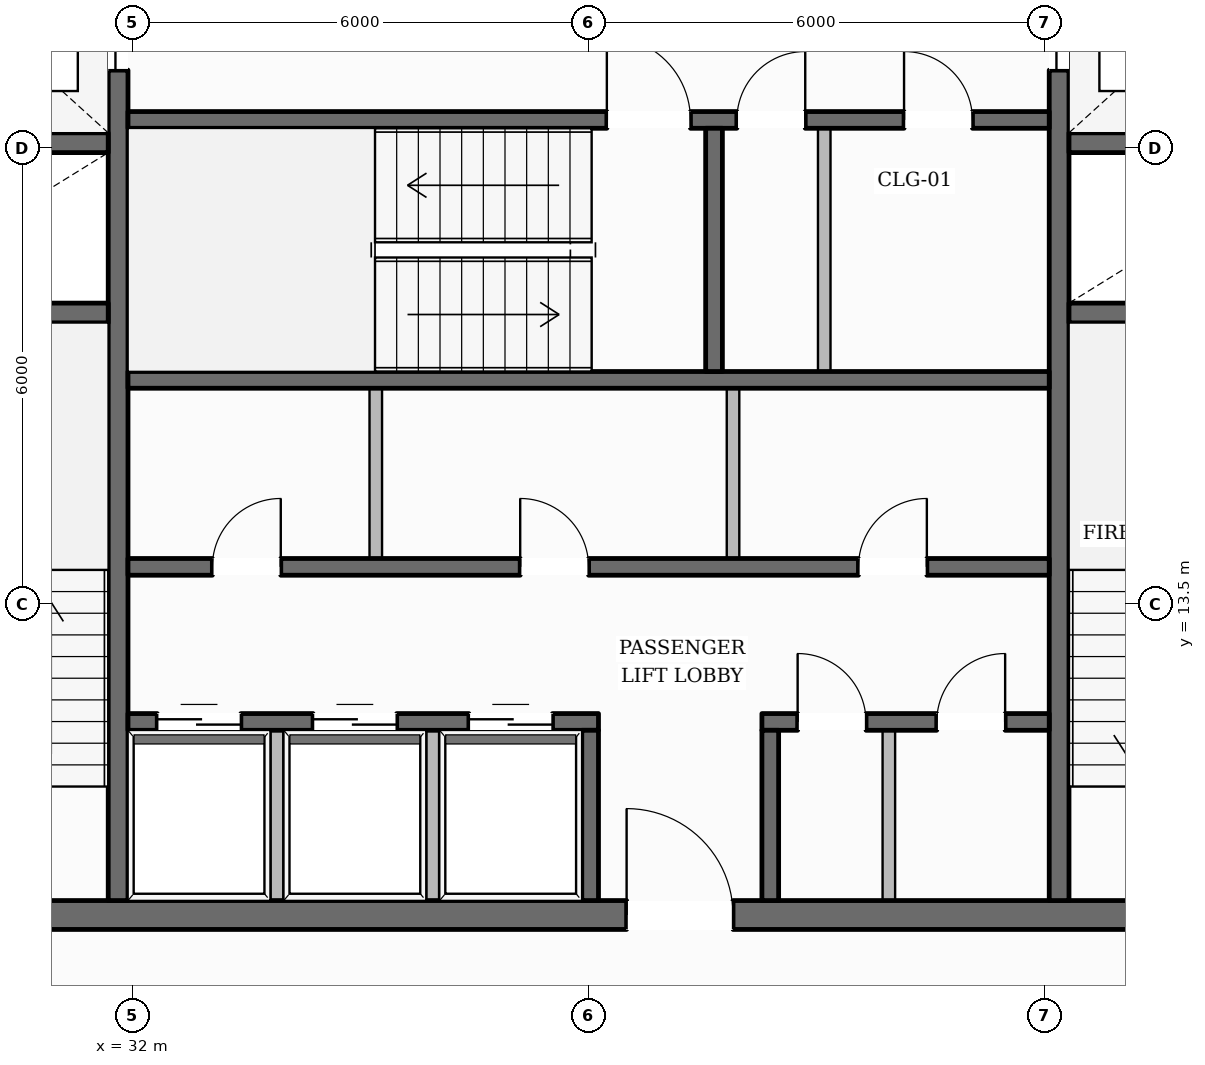
"""IFC4 building model, lengths in metres.
Left out: names, types, materials, properties, quantities, classifications, styles, units other than length and angle.
Written with IfcOpenShell. Run it as: python <this file> out.ifc"""

import sys

from ifc_helpers import new_model, si_unit, direction, frame, frame_2d, origin, place, context, subcontext, project, spatial, rectangle, extrude, element, fill, save


model = new_model("IFC4")
c1 = context("Model", 3, precision=1e-05, world=origin(), true_north=direction((0.0, 1.0)))
c2 = subcontext(c1, "Body", "Model", "MODEL_VIEW")
j1 = project(units=[si_unit("LENGTHUNIT", "METRE"), si_unit("PLANEANGLEUNIT", "RADIAN")], contexts=[c1])
p1 = place(None, origin())
s1 = spatial("IfcSite", under=j1, at=p1, CompositionType="ELEMENT")
p2 = place(p1, origin())
s2 = spatial("IfcBuilding", under=s1, at=p2, CompositionType="ELEMENT")
p3 = place(p2, frame((0.0, 0.0, 301.1)))
s3 = spatial("IfcBuildingStorey", under=s2, at=p3, CompositionType="ELEMENT", Elevation=301.1)
p4 = place(p3, frame((28.1, 9.41, 0.0), z_axis=(0.0, 0.0, 1.0), x_axis=(1.0, 0.0, 0.0)))
e1 = element("IfcWall", 1, at=p4, inside=s3, PredefinedType="SOLIDWALL", context=c2, shape_type="SweptSolid", body=[
    extrude(rectangle(XDim=19.8, YDim=0.38, at=frame_2d((9.9, 0.0))), origin(), (0.0, 0.0, 1.0), 3.635),
])
p5 = place(p4, frame((10.4, 0.0, 0.0)))
e2 = element("IfcOpeningElement", 2, at=p5, cuts=e1, PredefinedType="OPENING", context=c2, shape_type="SweptSolid", body=[
    extrude(rectangle(XDim=1.4, YDim=2.2, at=frame_2d((0.7, 1.1))), frame((0.0, 0.2, 0.0), z_axis=(0.0, -1.0, 0.0), x_axis=(1.0, 0.0, 0.0)), (0.0, 0.0, 1.0), 0.4),
])
p6 = place(p3, frame((31.81, 9.6, 0.0), z_axis=(0.0, 0.0, 1.0), x_axis=(0.0, 1.0, 0.0)))
e3 = element("IfcWall", 3, at=p6, inside=s3, PredefinedType="SHEAR", context=c2, shape_type="SweptSolid", body=[
    extrude(rectangle(XDim=13.0, YDim=0.26, at=frame_2d((6.5, 0.0))), origin(), (0.0, 0.0, 1.0), 3.635),
])
p7 = place(p6, frame((10.925, 0.0, 0.0)))
e4 = element("IfcOpeningElement", 4, at=p7, cuts=e3, PredefinedType="OPENING", context=c2, shape_type="SweptSolid", body=[
    extrude(rectangle(XDim=1.25, YDim=2.25, at=frame_2d((0.625, 1.125))), frame((0.0, 0.14, 0.0), z_axis=(0.0, -1.0, 0.0), x_axis=(1.0, 0.0, 0.0)), (0.0, 0.0, 1.0), 0.28),
])
p8 = place(p3, frame((44.19, 9.6, 0.0), z_axis=(0.0, 0.0, 1.0), x_axis=(0.0, 1.0, 0.0)))
e5 = element("IfcWall", 5, at=p8, inside=s3, PredefinedType="SHEAR", context=c2, shape_type="SweptSolid", body=[
    extrude(rectangle(XDim=13.0, YDim=0.26, at=frame_2d((6.5, 0.0))), origin(), (0.0, 0.0, 1.0), 3.635),
])
p9 = place(p8, frame((10.925, 0.0, 0.0)))
e6 = element("IfcOpeningElement", 6, at=p9, cuts=e5, PredefinedType="OPENING", context=c2, shape_type="SweptSolid", body=[
    extrude(rectangle(XDim=1.25, YDim=2.25, at=frame_2d((0.625, 1.125))), frame((0.0, 0.14, 0.0), z_axis=(0.0, -1.0, 0.0), x_axis=(1.0, 0.0, 0.0)), (0.0, 0.0, 1.0), 0.28),
])
for number, where, z_axis, x_axis in (
    (7, (28.48, 17.33, 0.0), (0.0, 0.0, 1.0), (1.0, 0.0, 0.0)),
    (8, (28.48, 19.57, 0.0), (0.0, 0.0, 1.0), (1.0, 0.0, 0.0)),
    (9, (44.32, 17.33, 0.0), (0.0, 0.0, 1.0), (1.0, 0.0, 0.0)),
    (10, (44.32, 19.57, 0.0), (0.0, 0.0, 1.0), (1.0, 0.0, 0.0)),
):
    element("IfcWall", number, at=place(p3, frame(where, z_axis=z_axis, x_axis=x_axis)), inside=s3, PredefinedType="SHEAR", context=c2, shape_type="SweptSolid", body=[
        extrude(rectangle(XDim=3.2, YDim=0.26, at=frame_2d((1.6, 0.0))), origin(), (0.0, 0.0, 1.0), 3.635),
    ])
p10 = place(p3, frame((31.94, 19.87, 0.0), z_axis=(0.0, 0.0, 1.0), x_axis=(1.0, 0.0, 0.0)))
e11 = element("IfcWall", 11, at=p10, inside=s3, PredefinedType="SOLIDWALL", context=c2, shape_type="SweptSolid", body=[
    extrude(rectangle(XDim=12.12, YDim=0.22, at=frame_2d((6.06, 0.0))), origin(), (0.0, 0.0, 1.0), 3.635),
])
p11 = place(p10, frame((6.3, 0.0, 0.0)))
e12 = element("IfcOpeningElement", 12, at=p11, cuts=e11, PredefinedType="OPENING", context=c2, shape_type="SweptSolid", body=[
    extrude(rectangle(XDim=1.1, YDim=2.15, at=frame_2d((0.55, 1.075))), frame((0.0, 0.12, 0.0), z_axis=(0.0, -1.0, 0.0), x_axis=(1.0, 0.0, 0.0)), (0.0, 0.0, 1.0), 0.24),
])
p12 = place(p10, frame((8.01, 0.0, 0.0)))
e13 = element("IfcOpeningElement", 13, at=p12, cuts=e11, PredefinedType="OPENING", context=c2, shape_type="SweptSolid", body=[
    extrude(rectangle(XDim=0.9, YDim=2.1, at=frame_2d((0.45, 1.05))), frame((0.0, 0.12, 0.0), z_axis=(0.0, -1.0, 0.0), x_axis=(1.0, 0.0, 0.0)), (0.0, 0.0, 1.0), 0.24),
])
p13 = place(p10, frame((10.21, 0.0, 0.0)))
e14 = element("IfcOpeningElement", 14, at=p13, cuts=e11, PredefinedType="OPENING", context=c2, shape_type="SweptSolid", body=[
    extrude(rectangle(XDim=0.9, YDim=2.1, at=frame_2d((0.45, 1.05))), frame((0.0, 0.12, 0.0), z_axis=(0.0, -1.0, 0.0), x_axis=(1.0, 0.0, 0.0)), (0.0, 0.0, 1.0), 0.24),
])
p14 = place(p3, frame((31.94, 16.45, 0.0), z_axis=(0.0, 0.0, 1.0), x_axis=(1.0, 0.0, 0.0)))
e15 = element("IfcWall", 15, at=p14, inside=s3, PredefinedType="SOLIDWALL", context=c2, shape_type="SweptSolid", body=[
    extrude(rectangle(XDim=12.12, YDim=0.22, at=frame_2d((6.06, 0.0))), origin(), (0.0, 0.0, 1.0), 3.635),
])
p15 = place(p3, frame((39.65, 16.56, 0.0), z_axis=(0.0, 0.0, 1.0), x_axis=(0.0, 1.0, 0.0)))
e16 = element("IfcWall", 16, at=p15, inside=s3, PredefinedType="SOLIDWALL", context=c2, shape_type="SweptSolid", body=[
    extrude(rectangle(XDim=3.2, YDim=0.22, at=frame_2d((1.6, 0.0))), origin(), (0.0, 0.0, 1.0), 3.635),
])
p16 = place(p3, frame((31.94, 13.99, 0.0), z_axis=(0.0, 0.0, 1.0), x_axis=(1.0, 0.0, 0.0)))
e17 = element("IfcWall", 17, at=p16, inside=s3, PredefinedType="SOLIDWALL", context=c2, shape_type="SweptSolid", body=[
    extrude(rectangle(XDim=12.12, YDim=0.22, at=frame_2d((6.06, 0.0))), origin(), (0.0, 0.0, 1.0), 3.635),
])
p17 = place(p16, frame((1.11, 0.0, 0.0)))
e18 = element("IfcOpeningElement", 18, at=p17, cuts=e17, PredefinedType="OPENING", context=c2, shape_type="SweptSolid", body=[
    extrude(rectangle(XDim=0.9, YDim=2.1, at=frame_2d((0.45, 1.05))), frame((0.0, 0.12, 0.0), z_axis=(0.0, -1.0, 0.0), x_axis=(1.0, 0.0, 0.0)), (0.0, 0.0, 1.0), 0.24),
])
p18 = place(p16, frame((5.16, 0.0, 0.0)))
e19 = element("IfcOpeningElement", 19, at=p18, cuts=e17, PredefinedType="OPENING", context=c2, shape_type="SweptSolid", body=[
    extrude(rectangle(XDim=0.9, YDim=2.1, at=frame_2d((0.45, 1.05))), frame((0.0, 0.12, 0.0), z_axis=(0.0, -1.0, 0.0), x_axis=(1.0, 0.0, 0.0)), (0.0, 0.0, 1.0), 0.24),
])
p19 = place(p16, frame((9.61, 0.0, 0.0)))
e20 = element("IfcOpeningElement", 20, at=p19, cuts=e17, PredefinedType="OPENING", context=c2, shape_type="SweptSolid", body=[
    extrude(rectangle(XDim=0.9, YDim=2.1, at=frame_2d((0.45, 1.05))), frame((0.0, 0.12, 0.0), z_axis=(0.0, -1.0, 0.0), x_axis=(1.0, 0.0, 0.0)), (0.0, 0.0, 1.0), 0.24),
])
p20 = place(p3, frame((31.94, 11.95, 0.0), z_axis=(0.0, 0.0, 1.0), x_axis=(1.0, 0.0, 0.0)))
e21 = element("IfcWall", 21, at=p20, inside=s3, PredefinedType="SOLIDWALL", context=c2, shape_type="SweptSolid", body=[
    extrude(rectangle(XDim=6.19, YDim=0.22, at=frame_2d((3.095, 0.0))), origin(), (0.0, 0.0, 1.0), 3.635),
])
p21 = place(p20, frame((0.385, 0.0, 0.0)))
e22 = element("IfcOpeningElement", 22, at=p21, cuts=e21, PredefinedType="OPENING", context=c2, shape_type="SweptSolid", body=[
    extrude(rectangle(XDim=1.1, YDim=2.2, at=frame_2d((0.55, 1.1))), frame((0.0, 0.12, 0.0), z_axis=(0.0, -1.0, 0.0), x_axis=(1.0, 0.0, 0.0)), (0.0, 0.0, 1.0), 0.24),
])
p22 = place(p20, frame((2.435, 0.0, 0.0)))
e23 = element("IfcOpeningElement", 23, at=p22, cuts=e21, PredefinedType="OPENING", context=c2, shape_type="SweptSolid", body=[
    extrude(rectangle(XDim=1.1, YDim=2.2, at=frame_2d((0.55, 1.1))), frame((0.0, 0.12, 0.0), z_axis=(0.0, -1.0, 0.0), x_axis=(1.0, 0.0, 0.0)), (0.0, 0.0, 1.0), 0.24),
])
p23 = place(p20, frame((4.485, 0.0, 0.0)))
e24 = element("IfcOpeningElement", 24, at=p23, cuts=e21, PredefinedType="OPENING", context=c2, shape_type="SweptSolid", body=[
    extrude(rectangle(XDim=1.1, YDim=2.2, at=frame_2d((0.55, 1.1))), frame((0.0, 0.12, 0.0), z_axis=(0.0, -1.0, 0.0), x_axis=(1.0, 0.0, 0.0)), (0.0, 0.0, 1.0), 0.24),
])
p24 = place(p3, frame((40.28, 11.95, 0.0), z_axis=(0.0, 0.0, 1.0), x_axis=(1.0, 0.0, 0.0)))
e25 = element("IfcWall", 25, at=p24, inside=s3, PredefinedType="SOLIDWALL", context=c2, shape_type="SweptSolid", body=[
    extrude(rectangle(XDim=3.78, YDim=0.22, at=frame_2d((1.89, 0.0))), origin(), (0.0, 0.0, 1.0), 3.635),
])
p25 = place(p24, frame((0.47, 0.0, 0.0)))
e26 = element("IfcOpeningElement", 26, at=p25, cuts=e25, PredefinedType="OPENING", context=c2, shape_type="SweptSolid", body=[
    extrude(rectangle(XDim=0.9, YDim=2.1, at=frame_2d((0.45, 1.05))), frame((0.0, 0.12, 0.0), z_axis=(0.0, -1.0, 0.0), x_axis=(1.0, 0.0, 0.0)), (0.0, 0.0, 1.0), 0.24),
])
p26 = place(p24, frame((2.3, 0.0, 0.0)))
e27 = element("IfcOpeningElement", 27, at=p26, cuts=e25, PredefinedType="OPENING", context=c2, shape_type="SweptSolid", body=[
    extrude(rectangle(XDim=0.9, YDim=2.1, at=frame_2d((0.45, 1.05))), frame((0.0, 0.12, 0.0), z_axis=(0.0, -1.0, 0.0), x_axis=(1.0, 0.0, 0.0)), (0.0, 0.0, 1.0), 0.24),
])
for number, where, z_axis, x_axis in (
    (28, (38.02, 9.6, 0.0), (0.0, 0.0, 1.0), (0.0, 1.0, 0.0)),
    (29, (40.39, 9.6, 0.0), (0.0, 0.0, 1.0), (0.0, 1.0, 0.0)),
):
    element("IfcWall", number, at=place(p3, frame(where, z_axis=z_axis, x_axis=x_axis)), inside=s3, PredefinedType="SOLIDWALL", context=c2, shape_type="SweptSolid", body=[
        extrude(rectangle(XDim=2.24, YDim=0.22, at=frame_2d((1.12, 0.0))), origin(), (0.0, 0.0, 1.0), 3.635),
    ])
p27 = place(p3, frame((15.771, 10.179, 0.0), z_axis=(0.0, 0.0, 1.0), x_axis=(0.493569993775, 0.869706077503, 0.0)))
e30 = element("IfcWall", 30, at=p27, inside=s3, PredefinedType="STANDARD", context=c2, shape_type="SweptSolid", body=[
    extrude(rectangle(XDim=39.897, YDim=0.35, at=frame_2d((19.949, 0.0))), origin(), (0.0, 0.0, 1.0), 3.221),
])
p28 = place(p27, frame((35.499, 0.0, 0.65)))
e31 = element("IfcOpeningElement", 31, at=p28, cuts=e30, PredefinedType="OPENING", context=c2, shape_type="SweptSolid", body=[
    extrude(rectangle(XDim=1.35, YDim=1.75, at=frame_2d((0.675, 0.875))), frame((0.0, 0.185, 0.0), z_axis=(0.0, -1.0, 0.0), x_axis=(1.0, 0.0, 0.0)), (0.0, 0.0, 1.0), 0.37),
])
p29 = place(p27, frame((29.007, 0.0, 0.65)))
e32 = element("IfcOpeningElement", 32, at=p29, cuts=e30, PredefinedType="OPENING", context=c2, shape_type="SweptSolid", body=[
    extrude(rectangle(XDim=1.35, YDim=1.75, at=frame_2d((0.675, 0.875))), frame((0.0, 0.185, 0.0), z_axis=(0.0, -1.0, 0.0), x_axis=(1.0, 0.0, 0.0)), (0.0, 0.0, 1.0), 0.37),
])
p30 = place(p27, frame((22.516, 0.0, 0.65)))
e33 = element("IfcOpeningElement", 33, at=p30, cuts=e30, PredefinedType="OPENING", context=c2, shape_type="SweptSolid", body=[
    extrude(rectangle(XDim=1.35, YDim=1.75, at=frame_2d((0.675, 0.875))), frame((0.0, 0.185, 0.0), z_axis=(0.0, -1.0, 0.0), x_axis=(1.0, 0.0, 0.0)), (0.0, 0.0, 1.0), 0.37),
])
p31 = place(p27, frame((9.533, 0.0, 0.65)))
e34 = element("IfcOpeningElement", 34, at=p31, cuts=e30, PredefinedType="OPENING", context=c2, shape_type="SweptSolid", body=[
    extrude(rectangle(XDim=1.35, YDim=1.75, at=frame_2d((0.675, 0.875))), frame((0.0, 0.185, 0.0), z_axis=(0.0, -1.0, 0.0), x_axis=(1.0, 0.0, 0.0)), (0.0, 0.0, 1.0), 0.37),
])
p32 = place(p27, frame((3.042, 0.0, 0.65)))
e35 = element("IfcOpeningElement", 35, at=p32, cuts=e30, PredefinedType="OPENING", context=c2, shape_type="SweptSolid", body=[
    extrude(rectangle(XDim=1.35, YDim=1.75, at=frame_2d((0.675, 0.875))), frame((0.0, 0.185, 0.0), z_axis=(0.0, -1.0, 0.0), x_axis=(1.0, 0.0, 0.0)), (0.0, 0.0, 1.0), 0.37),
])
p33 = place(p3, frame((40.491, 44.906, 0.0), z_axis=(0.0, 0.0, 1.0), x_axis=(0.489429021632, -0.872043136997, 0.0)))
e36 = element("IfcWall", 36, at=p33, inside=s3, PredefinedType="STANDARD", context=c2, shape_type="SweptSolid", body=[
    extrude(rectangle(XDim=39.581, YDim=0.35, at=frame_2d((19.79, 0.0))), origin(), (0.0, 0.0, 1.0), 3.221),
])
p34 = place(p33, frame((29.085, 0.0, 0.0)))
e37 = element("IfcOpeningElement", 37, at=p34, cuts=e36, PredefinedType="OPENING", context=c2, shape_type="SweptSolid", body=[
    extrude(rectangle(XDim=1.0, YDim=2.2, at=frame_2d((0.5, 1.1))), frame((0.0, 0.185, 0.0), z_axis=(0.0, -1.0, 0.0), x_axis=(1.0, 0.0, 0.0)), (0.0, 0.0, 1.0), 0.37),
])
p35 = place(p33, frame((35.216, 0.0, 0.65)))
e38 = element("IfcOpeningElement", 38, at=p35, cuts=e36, PredefinedType="OPENING", context=c2, shape_type="SweptSolid", body=[
    extrude(rectangle(XDim=1.35, YDim=1.75, at=frame_2d((0.675, 0.875))), frame((0.0, 0.185, 0.0), z_axis=(0.0, -1.0, 0.0), x_axis=(1.0, 0.0, 0.0)), (0.0, 0.0, 1.0), 0.37),
])
p36 = place(p33, frame((22.34, 0.0, 0.65)))
e39 = element("IfcOpeningElement", 39, at=p36, cuts=e36, PredefinedType="OPENING", context=c2, shape_type="SweptSolid", body=[
    extrude(rectangle(XDim=1.35, YDim=1.75, at=frame_2d((0.675, 0.875))), frame((0.0, 0.185, 0.0), z_axis=(0.0, -1.0, 0.0), x_axis=(1.0, 0.0, 0.0)), (0.0, 0.0, 1.0), 0.37),
])
p37 = place(p33, frame((9.464, 0.0, 0.65)))
e40 = element("IfcOpeningElement", 40, at=p37, cuts=e36, PredefinedType="OPENING", context=c2, shape_type="SweptSolid", body=[
    extrude(rectangle(XDim=1.35, YDim=1.75, at=frame_2d((0.675, 0.875))), frame((0.0, 0.185, 0.0), z_axis=(0.0, -1.0, 0.0), x_axis=(1.0, 0.0, 0.0)), (0.0, 0.0, 1.0), 0.37),
])
p38 = place(p33, frame((3.026, 0.0, 0.65)))
e41 = element("IfcOpeningElement", 41, at=p38, cuts=e36, PredefinedType="OPENING", context=c2, shape_type="SweptSolid", body=[
    extrude(rectangle(XDim=1.35, YDim=1.75, at=frame_2d((0.675, 0.875))), frame((0.0, 0.185, 0.0), z_axis=(0.0, -1.0, 0.0), x_axis=(1.0, 0.0, 0.0)), (0.0, 0.0, 1.0), 0.37),
])
for number, where, z_axis, x_axis in (
    (42, (33.9, 9.49, 0.0), (0.0, 0.0, 1.0), (0.0, 1.0, 0.0)),
    (43, (35.95, 9.49, 0.0), (0.0, 0.0, 1.0), (0.0, 1.0, 0.0)),
):
    element("IfcWall", number, at=place(p3, frame(where, z_axis=z_axis, x_axis=x_axis)), inside=s3, PredefinedType="PARTITIONING", context=c2, shape_type="SweptSolid", body=[
        extrude(rectangle(XDim=2.35, YDim=0.165, at=frame_2d((1.175, 0.0))), origin(), (0.0, 0.0, 1.0), 3.635),
    ])
for number, where, z_axis, x_axis in (
    (44, (35.2, 14.1, 0.0), (0.0, 0.0, 1.0), (0.0, 1.0, 0.0)),
    (45, (39.9, 14.1, 0.0), (0.0, 0.0, 1.0), (0.0, 1.0, 0.0)),
):
    element("IfcWall", number, at=place(p3, frame(where, z_axis=z_axis, x_axis=x_axis)), inside=s3, PredefinedType="PARTITIONING", context=c2, shape_type="SweptSolid", body=[
        extrude(rectangle(XDim=2.24, YDim=0.165, at=frame_2d((1.12, 0.0))), origin(), (0.0, 0.0, 1.0), 3.635),
    ])
p39 = place(p3, frame((41.1, 16.56, 0.0), z_axis=(0.0, 0.0, 1.0), x_axis=(0.0, 1.0, 0.0)))
e46 = element("IfcWall", 46, at=p39, inside=s3, PredefinedType="PARTITIONING", context=c2, shape_type="SweptSolid", body=[
    extrude(rectangle(XDim=3.2, YDim=0.165, at=frame_2d((1.6, 0.0))), origin(), (0.0, 0.0, 1.0), 3.635),
])
p40 = place(p3, frame((41.95, 9.49, 0.0), z_axis=(0.0, 0.0, 1.0), x_axis=(0.0, 1.0, 0.0)))
e47 = element("IfcWall", 47, at=p40, inside=s3, PredefinedType="PARTITIONING", context=c2, shape_type="SweptSolid", body=[
    extrude(rectangle(XDim=2.35, YDim=0.165, at=frame_2d((1.175, 0.0))), origin(), (0.0, 0.0, 1.0), 3.635),
])
p41 = place(p11, origin())
e48 = element("IfcDoor", 48, at=p41, inside=s3, OperationType="SINGLE_SWING_LEFT", PredefinedType="DOOR", context=c2, shape_type="SweptSolid", body=[
    extrude(rectangle(XDim=1.1, YDim=2.15, at=frame_2d((0.55, 1.075))), frame((0.0, 0.025, 0.0), z_axis=(0.0, -1.0, 0.0), x_axis=(1.0, 0.0, 0.0)), (0.0, 0.0, 1.0), 0.05),
])
fill(e12, e48)
p42 = place(p7, origin())
e49 = element("IfcDoor", 49, at=p42, inside=s3, OperationType="DOUBLE_DOOR_SLIDING", PredefinedType="DOOR", context=c2, shape_type="SweptSolid", body=[
    extrude(rectangle(XDim=1.25, YDim=2.25, at=frame_2d((0.625, 1.125))), frame((0.0, 0.025, 0.0), z_axis=(0.0, -1.0, 0.0), x_axis=(1.0, 0.0, 0.0)), (0.0, 0.0, 1.0), 0.05),
])
fill(e4, e49)
p43 = place(p9, origin())
e50 = element("IfcDoor", 50, at=p43, inside=s3, OperationType="DOUBLE_DOOR_SLIDING", PredefinedType="DOOR", context=c2, shape_type="SweptSolid", body=[
    extrude(rectangle(XDim=1.25, YDim=2.25, at=frame_2d((0.625, 1.125))), frame((0.0, 0.025, 0.0), z_axis=(0.0, -1.0, 0.0), x_axis=(1.0, 0.0, 0.0)), (0.0, 0.0, 1.0), 0.05),
])
fill(e6, e50)
p44 = place(p5, origin())
e51 = element("IfcDoor", 51, at=p44, inside=s3, OperationType="SINGLE_SWING_LEFT", PredefinedType="DOOR", context=c2, shape_type="SweptSolid", body=[
    extrude(rectangle(XDim=1.4, YDim=2.2, at=frame_2d((0.7, 1.1))), frame((0.0, 0.025, 0.0), z_axis=(0.0, -1.0, 0.0), x_axis=(1.0, 0.0, 0.0)), (0.0, 0.0, 1.0), 0.05),
])
fill(e2, e51)
p45 = place(p21, origin())
e52 = element("IfcDoor", 52, at=p45, inside=s3, OperationType="DOUBLE_DOOR_SLIDING", PredefinedType="DOOR", context=c2, shape_type="SweptSolid", body=[
    extrude(rectangle(XDim=1.1, YDim=2.2, at=frame_2d((0.55, 1.1))), frame((0.0, 0.025, 0.0), z_axis=(0.0, -1.0, 0.0), x_axis=(1.0, 0.0, 0.0)), (0.0, 0.0, 1.0), 0.05),
])
fill(e22, e52)
p46 = place(p22, origin())
e53 = element("IfcDoor", 53, at=p46, inside=s3, OperationType="DOUBLE_DOOR_SLIDING", PredefinedType="DOOR", context=c2, shape_type="SweptSolid", body=[
    extrude(rectangle(XDim=1.1, YDim=2.2, at=frame_2d((0.55, 1.1))), frame((0.0, 0.025, 0.0), z_axis=(0.0, -1.0, 0.0), x_axis=(1.0, 0.0, 0.0)), (0.0, 0.0, 1.0), 0.05),
])
fill(e23, e53)
p47 = place(p23, origin())
e54 = element("IfcDoor", 54, at=p47, inside=s3, OperationType="DOUBLE_DOOR_SLIDING", PredefinedType="DOOR", context=c2, shape_type="SweptSolid", body=[
    extrude(rectangle(XDim=1.1, YDim=2.2, at=frame_2d((0.55, 1.1))), frame((0.0, 0.025, 0.0), z_axis=(0.0, -1.0, 0.0), x_axis=(1.0, 0.0, 0.0)), (0.0, 0.0, 1.0), 0.05),
])
fill(e24, e54)
p48 = place(p17, origin())
e55 = element("IfcDoor", 55, at=p48, inside=s3, OperationType="SINGLE_SWING_RIGHT", PredefinedType="DOOR", context=c2, shape_type="SweptSolid", body=[
    extrude(rectangle(XDim=0.9, YDim=2.1, at=frame_2d((0.45, 1.05))), frame((0.0, 0.025, 0.0), z_axis=(0.0, -1.0, 0.0), x_axis=(1.0, 0.0, 0.0)), (0.0, 0.0, 1.0), 0.05),
])
fill(e18, e55)
p49 = place(p18, origin())
e56 = element("IfcDoor", 56, at=p49, inside=s3, OperationType="SINGLE_SWING_LEFT", PredefinedType="DOOR", context=c2, shape_type="SweptSolid", body=[
    extrude(rectangle(XDim=0.9, YDim=2.1, at=frame_2d((0.45, 1.05))), frame((0.0, 0.025, 0.0), z_axis=(0.0, -1.0, 0.0), x_axis=(1.0, 0.0, 0.0)), (0.0, 0.0, 1.0), 0.05),
])
fill(e19, e56)
p50 = place(p19, origin())
e57 = element("IfcDoor", 57, at=p50, inside=s3, OperationType="SINGLE_SWING_RIGHT", PredefinedType="DOOR", context=c2, shape_type="SweptSolid", body=[
    extrude(rectangle(XDim=0.9, YDim=2.1, at=frame_2d((0.45, 1.05))), frame((0.0, 0.025, 0.0), z_axis=(0.0, -1.0, 0.0), x_axis=(1.0, 0.0, 0.0)), (0.0, 0.0, 1.0), 0.05),
])
fill(e20, e57)
p51 = place(p12, origin())
e58 = element("IfcDoor", 58, at=p51, inside=s3, OperationType="SINGLE_SWING_RIGHT", PredefinedType="DOOR", context=c2, shape_type="SweptSolid", body=[
    extrude(rectangle(XDim=0.9, YDim=2.1, at=frame_2d((0.45, 1.05))), frame((0.0, 0.025, 0.0), z_axis=(0.0, -1.0, 0.0), x_axis=(1.0, 0.0, 0.0)), (0.0, 0.0, 1.0), 0.05),
])
fill(e13, e58)
p52 = place(p13, origin())
e59 = element("IfcDoor", 59, at=p52, inside=s3, OperationType="SINGLE_SWING_LEFT", PredefinedType="DOOR", context=c2, shape_type="SweptSolid", body=[
    extrude(rectangle(XDim=0.9, YDim=2.1, at=frame_2d((0.45, 1.05))), frame((0.0, 0.025, 0.0), z_axis=(0.0, -1.0, 0.0), x_axis=(1.0, 0.0, 0.0)), (0.0, 0.0, 1.0), 0.05),
])
fill(e14, e59)
p53 = place(p25, origin())
e60 = element("IfcDoor", 60, at=p53, inside=s3, OperationType="SINGLE_SWING_LEFT", PredefinedType="DOOR", context=c2, shape_type="SweptSolid", body=[
    extrude(rectangle(XDim=0.9, YDim=2.1, at=frame_2d((0.45, 1.05))), frame((0.0, 0.025, 0.0), z_axis=(0.0, -1.0, 0.0), x_axis=(1.0, 0.0, 0.0)), (0.0, 0.0, 1.0), 0.05),
])
fill(e26, e60)
p54 = place(p26, origin())
e61 = element("IfcDoor", 61, at=p54, inside=s3, OperationType="SINGLE_SWING_RIGHT", PredefinedType="DOOR", context=c2, shape_type="SweptSolid", body=[
    extrude(rectangle(XDim=0.9, YDim=2.1, at=frame_2d((0.45, 1.05))), frame((0.0, 0.025, 0.0), z_axis=(0.0, -1.0, 0.0), x_axis=(1.0, 0.0, 0.0)), (0.0, 0.0, 1.0), 0.05),
])
fill(e27, e61)
save(model, sys.argv[1])
